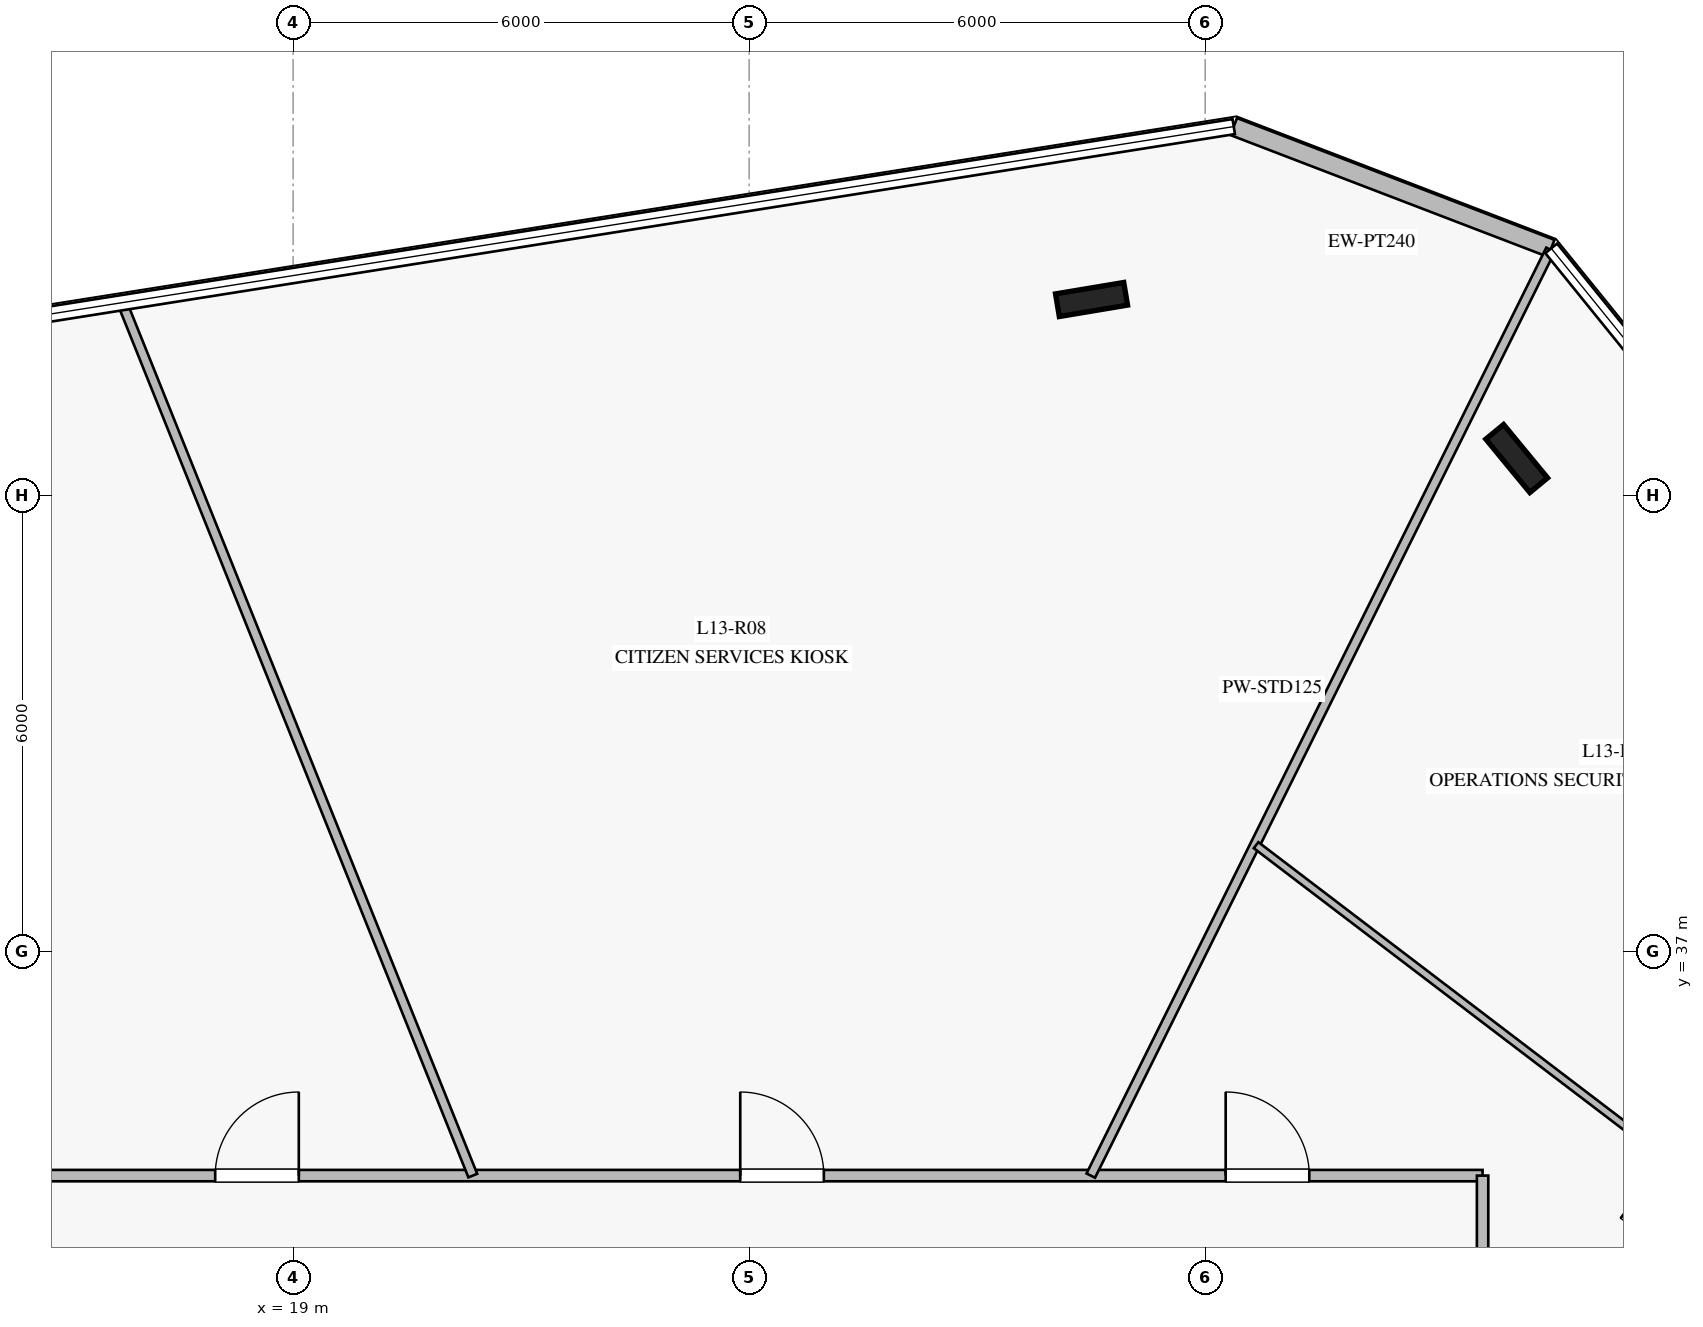
"""IFC4 building model, lengths in metres.
Left out: names, types, materials, properties, quantities, classifications, styles, units other than length and angle.
Written with IfcOpenShell. Run it as: python <this file> out.ifc"""

import sys

from ifc_helpers import new_model, si_unit, direction, frame, frame_2d, origin, origin_2d, place, context, subcontext, project, spatial, rectangle, i_section, extrude, element, fill, save


model = new_model("IFC4")
c1 = context("Model", 3, precision=1e-05, world=origin(), true_north=direction((0.0, 1.0)))
c2 = subcontext(c1, "Body", "Model", "MODEL_VIEW")
j1 = project(units=[si_unit("LENGTHUNIT", "METRE"), si_unit("PLANEANGLEUNIT", "RADIAN")], contexts=[c1])
p1 = place(None, origin())
s1 = spatial("IfcSite", under=j1, at=p1, CompositionType="ELEMENT")
p2 = place(p1, origin())
s2 = spatial("IfcBuilding", under=s1, at=p2, CompositionType="ELEMENT")
p3 = place(p2, frame((0.0, 0.0, 56.0)))
s3 = spatial("IfcBuildingStorey", under=s2, at=p3, CompositionType="ELEMENT", Elevation=56.0)
for number, where, z_axis, x_axis in (
    (1, (35.099, 43.484, 0.0), (0.0, 0.0, 1.0), (-0.636, 0.772, 0.0)),
    (2, (29.505, 45.576, 0.0), (0.0, 0.0, 1.0), (0.986, 0.165, 0.0)),
):
    element("IfcColumn", number, at=place(p3, frame(where, z_axis=z_axis, x_axis=x_axis)), inside=s3, PredefinedType="COLUMN", context=c2, shape_type="SweptSolid", body=[
        extrude(i_section(OverallWidth=0.302, OverallDepth=0.91, WebThickness=0.021, FlangeThickness=0.04, at=origin_2d()), origin(), (0.0, 0.0, 1.0), 4.0),
    ])
p4 = place(p3, frame((35.553, 46.249, 0.0), z_axis=(0.0, 0.0, 1.0), x_axis=(-0.933681352495, 0.358104917591, 0.0)))
e3 = element("IfcWall", 3, at=p4, inside=s3, PredefinedType="STANDARD", context=c2, shape_type="SweptSolid", body=[
    extrude(rectangle(XDim=4.474, YDim=0.24, at=frame_2d((2.237, 0.0))), origin(), (0.0, 0.0, 1.0), 3.76),
])
p5 = place(p3, frame((15.35, 34.05, 0.0), z_axis=(0.0, 0.0, 1.0), x_axis=(1.0, 0.0, 0.0)))
e4 = element("IfcWall", 4, at=p5, inside=s3, PredefinedType="PARTITIONING", context=c2, shape_type="SweptSolid", body=[
    extrude(rectangle(XDim=19.3, YDim=0.15, at=frame_2d((9.65, 0.0))), origin(), (0.0, 0.0, 1.0), 3.21),
])
p6 = place(p5, frame((15.92, 0.0, 0.0)))
e5 = element("IfcOpeningElement", 5, at=p6, cuts=e4, PredefinedType="OPENING", context=c2, shape_type="SweptSolid", body=[
    extrude(rectangle(XDim=1.1, YDim=2.2, at=frame_2d((0.55, 1.1))), frame((0.0, 0.085, 0.0), z_axis=(0.0, -1.0, 0.0), x_axis=(1.0, 0.0, 0.0)), (0.0, 0.0, 1.0), 0.17),
])
p7 = place(p5, frame((9.533, 0.0, 0.0)))
e6 = element("IfcOpeningElement", 6, at=p7, cuts=e4, PredefinedType="OPENING", context=c2, shape_type="SweptSolid", body=[
    extrude(rectangle(XDim=1.1, YDim=2.2, at=frame_2d((0.55, 1.1))), frame((0.0, 0.085, 0.0), z_axis=(0.0, -1.0, 0.0), x_axis=(1.0, 0.0, 0.0)), (0.0, 0.0, 1.0), 0.17),
])
p8 = place(p5, frame((2.625, 0.0, 0.0)))
e7 = element("IfcOpeningElement", 7, at=p8, cuts=e4, PredefinedType="OPENING", context=c2, shape_type="SweptSolid", body=[
    extrude(rectangle(XDim=1.1, YDim=2.2, at=frame_2d((0.55, 1.1))), frame((0.0, 0.085, 0.0), z_axis=(0.0, -1.0, 0.0), x_axis=(1.0, 0.0, 0.0)), (0.0, 0.0, 1.0), 0.17),
])
p9 = place(p3, frame((34.65, 34.05, 0.0), z_axis=(0.0, 0.0, 1.0), x_axis=(0.0, -1.0, 0.0)))
e8 = element("IfcWall", 8, at=p9, inside=s3, PredefinedType="PARTITIONING", context=c2, shape_type="SweptSolid", body=[
    extrude(rectangle(XDim=18.1, YDim=0.15, at=frame_2d((9.05, 0.0))), origin(), (0.0, 0.0, 1.0), 3.21),
])
p10 = place(p9, frame((15.616, 0.0, 0.0)))
e9 = element("IfcOpeningElement", 9, at=p10, cuts=e8, PredefinedType="OPENING", context=c2, shape_type="SweptSolid", body=[
    extrude(rectangle(XDim=1.1, YDim=2.2, at=frame_2d((0.55, 1.1))), frame((0.0, 0.085, 0.0), z_axis=(0.0, -1.0, 0.0), x_axis=(1.0, 0.0, 0.0)), (0.0, 0.0, 1.0), 0.17),
])
p11 = place(p9, frame((10.114, 0.0, 0.0)))
e10 = element("IfcOpeningElement", 10, at=p11, cuts=e8, PredefinedType="OPENING", context=c2, shape_type="SweptSolid", body=[
    extrude(rectangle(XDim=1.1, YDim=2.2, at=frame_2d((0.55, 1.1))), frame((0.0, 0.085, 0.0), z_axis=(0.0, -1.0, 0.0), x_axis=(1.0, 0.0, 0.0)), (0.0, 0.0, 1.0), 0.17),
])
p12 = place(p3, frame((29.495, 34.05, 0.0), z_axis=(0.0, 0.0, 1.0), x_axis=(0.444763351691, 0.895648123424, 0.0)))
e11 = element("IfcWall", 11, at=p12, inside=s3, PredefinedType="PARTITIONING", context=c2, shape_type="SweptSolid", body=[
    extrude(rectangle(XDim=13.6, YDim=0.125, at=frame_2d((6.8, 0.0))), origin(), (0.0, 0.0, 1.0), 3.06),
])
p13 = place(p3, frame((21.364, 34.05, 0.0), z_axis=(0.0, 0.0, 1.0), x_axis=(-0.372766267376, 0.927925271725, 0.0)))
e12 = element("IfcWall", 12, at=p13, inside=s3, PredefinedType="PARTITIONING", context=c2, shape_type="SweptSolid", body=[
    extrude(rectangle(XDim=12.359, YDim=0.125, at=frame_2d((6.179, 0.0))), origin(), (0.0, 0.0, 1.0), 3.05),
])
p14 = place(p3, frame((43.127, 29.673, 0.0), z_axis=(0.0, 0.0, 1.0), x_axis=(-0.795608764692, 0.605810773712, 0.0)))
e13 = element("IfcWall", 13, at=p14, inside=s3, PredefinedType="MOVABLE", context=c2, shape_type="SweptSolid", body=[
    extrude(rectangle(XDim=14.4, YDim=0.1, at=frame_2d((7.2, 0.0))), origin(), (0.0, 0.0, 1.0), 3.21),
])
p15 = place(p14, frame((6.611, 0.0, 0.0)))
e14 = element("IfcOpeningElement", 14, at=p15, cuts=e13, PredefinedType="OPENING", context=c2, shape_type="SweptSolid", body=[
    extrude(rectangle(XDim=1.0, YDim=2.15, at=frame_2d((0.5, 1.075))), frame((0.0, 0.06, 0.0), z_axis=(0.0, -1.0, 0.0), x_axis=(1.0, 0.0, 0.0)), (0.0, 0.0, 1.0), 0.12),
])
p16 = place(p6, origin())
e15 = element("IfcDoor", 15, at=p16, inside=s3, OperationType="SINGLE_SWING_LEFT", PredefinedType="DOOR", context=c2, shape_type="SweptSolid", body=[
    extrude(rectangle(XDim=1.1, YDim=2.2, at=frame_2d((0.55, 1.1))), frame((0.0, 0.025, 0.0), z_axis=(0.0, -1.0, 0.0), x_axis=(1.0, 0.0, 0.0)), (0.0, 0.0, 1.0), 0.05),
])
fill(e5, e15)
p17 = place(p7, origin())
e16 = element("IfcDoor", 16, at=p17, inside=s3, OperationType="SINGLE_SWING_LEFT", PredefinedType="DOOR", context=c2, shape_type="SweptSolid", body=[
    extrude(rectangle(XDim=1.1, YDim=2.2, at=frame_2d((0.55, 1.1))), frame((0.0, 0.025, 0.0), z_axis=(0.0, -1.0, 0.0), x_axis=(1.0, 0.0, 0.0)), (0.0, 0.0, 1.0), 0.05),
])
fill(e6, e16)
p18 = place(p8, origin())
e17 = element("IfcDoor", 17, at=p18, inside=s3, OperationType="SINGLE_SWING_RIGHT", PredefinedType="DOOR", context=c2, shape_type="SweptSolid", body=[
    extrude(rectangle(XDim=1.1, YDim=2.2, at=frame_2d((0.55, 1.1))), frame((0.0, 0.025, 0.0), z_axis=(0.0, -1.0, 0.0), x_axis=(1.0, 0.0, 0.0)), (0.0, 0.0, 1.0), 0.05),
])
fill(e7, e17)
save(model, sys.argv[1])
